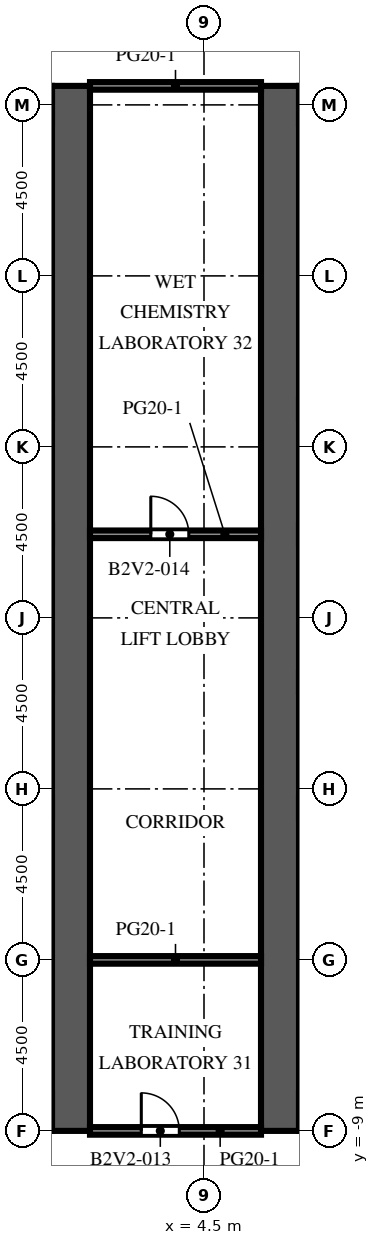
"""IFC4 building model, lengths in metres.
Left out: names, types, materials, properties, quantities, classifications, styles, units other than length and angle.
Written with IfcOpenShell. Run it as: python <this file> out.ifc"""

import sys

from ifc_helpers import new_model, si_unit, direction, frame, frame_2d, origin, place, context, subcontext, project, spatial, rectangle, extrude, element, fill, save


model = new_model("IFC4")
c1 = context("Model", 3, precision=1e-05, world=origin(), true_north=direction((0.0, 1.0)))
c2 = subcontext(c1, "Body", "Model", "MODEL_VIEW")
j1 = project(units=[si_unit("LENGTHUNIT", "METRE"), si_unit("PLANEANGLEUNIT", "RADIAN")], contexts=[c1])
p1 = place(None, origin())
s1 = spatial("IfcSite", under=j1, at=p1, CompositionType="ELEMENT")
p2 = place(p1, origin())
s2 = spatial("IfcBuilding", under=s1, at=p2, CompositionType="ELEMENT")
p3 = place(p2, frame((0.0, 0.0, 58.3)))
s3 = spatial("IfcBuildingStorey", under=s2, at=p3, CompositionType="ELEMENT", Elevation=58.3)
p4 = place(p3, frame((1.0, -9.0, 0.0), z_axis=(0.0, 0.0, 1.0), x_axis=(0.0, 1.0, 0.0)))
e1 = element("IfcWall", 1, at=p4, inside=s3, PredefinedType="SHEAR", context=c2, shape_type="SweptSolid", body=[
    extrude(rectangle(XDim=27.5, YDim=1.0, at=frame_2d((13.75, 0.0))), origin(), (0.0, 0.0, 1.0), 4.1),
])
p5 = place(p4, frame((12.55, 0.0, 0.0)))
e2 = element("IfcOpeningElement", 2, at=p5, cuts=e1, PredefinedType="OPENING", context=c2, shape_type="SweptSolid", body=[
    extrude(rectangle(XDim=2.4, YDim=2.4, at=frame_2d((1.2, 1.2))), frame((0.0, 0.51, 0.0), z_axis=(0.0, -1.0, 0.0), x_axis=(1.0, 0.0, 0.0)), (0.0, 0.0, 1.0), 1.02),
])
p6 = place(p4, frame((5.55, 0.0, 0.0)))
e3 = element("IfcOpeningElement", 3, at=p6, cuts=e1, PredefinedType="OPENING", context=c2, shape_type="SweptSolid", body=[
    extrude(rectangle(XDim=0.905, YDim=2.1, at=frame_2d((0.453, 1.05))), frame((0.0, 0.51, 0.0), z_axis=(0.0, -1.0, 0.0), x_axis=(1.0, 0.0, 0.0)), (0.0, 0.0, 1.0), 1.02),
])
p7 = place(p4, frame((23.363, 0.0, 0.0)))
e4 = element("IfcOpeningElement", 4, at=p7, cuts=e1, PredefinedType="OPENING", context=c2, shape_type="SweptSolid", body=[
    extrude(rectangle(XDim=1.2, YDim=2.1, at=frame_2d((0.6, 1.05))), frame((0.0, 0.51, 0.0), z_axis=(0.0, -1.0, 0.0), x_axis=(1.0, 0.0, 0.0)), (0.0, 0.0, 1.0), 1.02),
])
p8 = place(p3, frame((6.5, -9.0, 0.0), z_axis=(0.0, 0.0, 1.0), x_axis=(0.0, 1.0, 0.0)))
e5 = element("IfcWall", 5, at=p8, inside=s3, PredefinedType="SHEAR", context=c2, shape_type="SweptSolid", body=[
    extrude(rectangle(XDim=27.5, YDim=1.0, at=frame_2d((13.75, 0.0))), origin(), (0.0, 0.0, 1.0), 4.1),
])
p9 = place(p8, frame((12.55, 0.0, 0.0)))
e6 = element("IfcOpeningElement", 6, at=p9, cuts=e5, PredefinedType="OPENING", context=c2, shape_type="SweptSolid", body=[
    extrude(rectangle(XDim=2.4, YDim=2.4, at=frame_2d((1.2, 1.2))), frame((0.0, 0.51, 0.0), z_axis=(0.0, -1.0, 0.0), x_axis=(1.0, 0.0, 0.0)), (0.0, 0.0, 1.0), 1.02),
])
p10 = place(p8, frame((5.55, 0.0, 0.0)))
e7 = element("IfcOpeningElement", 7, at=p10, cuts=e5, PredefinedType="OPENING", context=c2, shape_type="SweptSolid", body=[
    extrude(rectangle(XDim=0.905, YDim=2.1, at=frame_2d((0.453, 1.05))), frame((0.0, 0.51, 0.0), z_axis=(0.0, -1.0, 0.0), x_axis=(1.0, 0.0, 0.0)), (0.0, 0.0, 1.0), 1.02),
])
p11 = place(p8, frame((23.363, 0.0, 0.0)))
e8 = element("IfcOpeningElement", 8, at=p11, cuts=e5, PredefinedType="OPENING", context=c2, shape_type="SweptSolid", body=[
    extrude(rectangle(XDim=1.2, YDim=2.1, at=frame_2d((0.6, 1.05))), frame((0.0, 0.51, 0.0), z_axis=(0.0, -1.0, 0.0), x_axis=(1.0, 0.0, 0.0)), (0.0, 0.0, 1.0), 1.02),
])
p12 = place(p3, frame((7.0, 12.425, 0.0), z_axis=(0.0, 0.0, 1.0), x_axis=(1.0, 0.0, 0.0)))
e9 = element("IfcWall", 9, at=p12, inside=s3, PredefinedType="PARTITIONING", context=c2, shape_type="SweptSolid", body=[
    extrude(rectangle(XDim=1.3, YDim=0.1, at=frame_2d((0.65, 0.0))), origin(), (0.0, 0.0, 1.0), 3.65),
])
p13 = place(p12, frame((0.2, 0.0, 0.0)))
e10 = element("IfcOpeningElement", 10, at=p13, cuts=e9, PredefinedType="OPENING", context=c2, shape_type="SweptSolid", body=[
    extrude(rectangle(XDim=0.9, YDim=2.1, at=frame_2d((0.45, 1.05))), frame((0.0, 0.06, 0.0), z_axis=(0.0, -1.0, 0.0), x_axis=(1.0, 0.0, 0.0)), (0.0, 0.0, 1.0), 0.12),
])
p14 = place(p3, frame((1.5, -9.0, 0.0), z_axis=(0.0, 0.0, 1.0), x_axis=(1.0, 0.0, 0.0)))
e11 = element("IfcWall", 11, at=p14, inside=s3, PredefinedType="PARTITIONING", context=c2, shape_type="SweptSolid", body=[
    extrude(rectangle(XDim=4.5, YDim=0.2, at=frame_2d((2.25, 0.0))), origin(), (0.0, 0.0, 1.0), 3.65),
])
p15 = place(p14, frame((1.35, 0.0, 0.0)))
e12 = element("IfcOpeningElement", 12, at=p15, cuts=e11, PredefinedType="OPENING", context=c2, shape_type="SweptSolid", body=[
    extrude(rectangle(XDim=1.0, YDim=2.1, at=frame_2d((0.5, 1.05))), frame((0.0, 0.11, 0.0), z_axis=(0.0, -1.0, 0.0), x_axis=(1.0, 0.0, 0.0)), (0.0, 0.0, 1.0), 0.22),
])
p16 = place(p3, frame((1.5, -4.5, 0.0), z_axis=(0.0, 0.0, 1.0), x_axis=(1.0, 0.0, 0.0)))
e13 = element("IfcWall", 13, at=p16, inside=s3, PredefinedType="PARTITIONING", context=c2, shape_type="SweptSolid", body=[
    extrude(rectangle(XDim=4.5, YDim=0.2, at=frame_2d((2.25, 0.0))), origin(), (0.0, 0.0, 1.0), 3.65),
])
p17 = place(p3, frame((1.5, 6.7, 0.0), z_axis=(0.0, 0.0, 1.0), x_axis=(1.0, 0.0, 0.0)))
e14 = element("IfcWall", 14, at=p17, inside=s3, PredefinedType="PARTITIONING", context=c2, shape_type="SweptSolid", body=[
    extrude(rectangle(XDim=4.5, YDim=0.2, at=frame_2d((2.25, 0.0))), origin(), (0.0, 0.0, 1.0), 3.65),
])
p18 = place(p17, frame((1.6, 0.0, 0.0)))
e15 = element("IfcOpeningElement", 15, at=p18, cuts=e14, PredefinedType="OPENING", context=c2, shape_type="SweptSolid", body=[
    extrude(rectangle(XDim=1.0, YDim=2.1, at=frame_2d((0.5, 1.05))), frame((0.0, 0.11, 0.0), z_axis=(0.0, -1.0, 0.0), x_axis=(1.0, 0.0, 0.0)), (0.0, 0.0, 1.0), 0.22),
])
p19 = place(p3, frame((1.5, 18.5, 0.0), z_axis=(0.0, 0.0, 1.0), x_axis=(1.0, 0.0, 0.0)))
e16 = element("IfcWall", 16, at=p19, inside=s3, PredefinedType="PARTITIONING", context=c2, shape_type="SweptSolid", body=[
    extrude(rectangle(XDim=4.5, YDim=0.2, at=frame_2d((2.25, 0.0))), origin(), (0.0, 0.0, 1.0), 3.65),
])
p20 = place(p5, origin())
e17 = element("IfcDoor", 17, at=p20, inside=s3, OperationType="DOUBLE_DOOR_DOUBLE_SWING", PredefinedType="DOOR", context=c2, shape_type="SweptSolid", body=[
    extrude(rectangle(XDim=2.4, YDim=2.4, at=frame_2d((1.2, 1.2))), frame((0.0, 0.025, 0.0), z_axis=(0.0, -1.0, 0.0), x_axis=(1.0, 0.0, 0.0)), (0.0, 0.0, 1.0), 0.05),
])
fill(e2, e17)
p21 = place(p9, origin())
e18 = element("IfcDoor", 18, at=p21, inside=s3, OperationType="DOUBLE_DOOR_DOUBLE_SWING", PredefinedType="DOOR", context=c2, shape_type="SweptSolid", body=[
    extrude(rectangle(XDim=2.4, YDim=2.4, at=frame_2d((1.2, 1.2))), frame((0.0, 0.025, 0.0), z_axis=(0.0, -1.0, 0.0), x_axis=(1.0, 0.0, 0.0)), (0.0, 0.0, 1.0), 0.05),
])
fill(e6, e18)
p22 = place(p6, origin())
e19 = element("IfcDoor", 19, at=p22, inside=s3, OperationType="SINGLE_SWING_LEFT", PredefinedType="DOOR", context=c2, shape_type="SweptSolid", body=[
    extrude(rectangle(XDim=0.905, YDim=2.1, at=frame_2d((0.453, 1.05))), frame((0.0, 0.475, 0.0), z_axis=(0.0, -1.0, 0.0), x_axis=(1.0, 0.0, 0.0)), (0.0, 0.0, 1.0), 0.05),
])
fill(e3, e19)
p23 = place(p7, origin())
e20 = element("IfcDoor", 20, at=p23, inside=s3, OperationType="SINGLE_SWING_RIGHT", PredefinedType="DOOR", context=c2, shape_type="SweptSolid", body=[
    extrude(rectangle(XDim=1.2, YDim=2.1, at=frame_2d((0.6, 1.05))), frame((0.0, 0.475, 0.0), z_axis=(0.0, -1.0, 0.0), x_axis=(1.0, 0.0, 0.0)), (0.0, 0.0, 1.0), 0.05),
])
fill(e4, e20)
p24 = place(p10, origin())
e21 = element("IfcDoor", 21, at=p24, inside=s3, OperationType="SINGLE_SWING_RIGHT", PredefinedType="DOOR", context=c2, shape_type="SweptSolid", body=[
    extrude(rectangle(XDim=0.905, YDim=2.1, at=frame_2d((0.453, 1.05))), frame((0.0, -0.425, 0.0), z_axis=(0.0, -1.0, 0.0), x_axis=(1.0, 0.0, 0.0)), (0.0, 0.0, 1.0), 0.05),
])
fill(e7, e21)
p25 = place(p11, origin())
e22 = element("IfcDoor", 22, at=p25, inside=s3, OperationType="SINGLE_SWING_LEFT", PredefinedType="DOOR", context=c2, shape_type="SweptSolid", body=[
    extrude(rectangle(XDim=1.2, YDim=2.1, at=frame_2d((0.6, 1.05))), frame((0.0, -0.425, 0.0), z_axis=(0.0, -1.0, 0.0), x_axis=(1.0, 0.0, 0.0)), (0.0, 0.0, 1.0), 0.05),
])
fill(e8, e22)
p26 = place(p15, origin())
e23 = element("IfcDoor", 23, at=p26, inside=s3, OperationType="SINGLE_SWING_LEFT", PredefinedType="DOOR", context=c2, shape_type="SweptSolid", body=[
    extrude(rectangle(XDim=1.0, YDim=2.1, at=frame_2d((0.5, 1.05))), frame((0.0, 0.025, 0.0), z_axis=(0.0, -1.0, 0.0), x_axis=(1.0, 0.0, 0.0)), (0.0, 0.0, 1.0), 0.05),
])
fill(e12, e23)
p27 = place(p18, origin())
e24 = element("IfcDoor", 24, at=p27, inside=s3, OperationType="SINGLE_SWING_LEFT", PredefinedType="DOOR", context=c2, shape_type="SweptSolid", body=[
    extrude(rectangle(XDim=1.0, YDim=2.1, at=frame_2d((0.5, 1.05))), frame((0.0, 0.025, 0.0), z_axis=(0.0, -1.0, 0.0), x_axis=(1.0, 0.0, 0.0)), (0.0, 0.0, 1.0), 0.05),
])
fill(e15, e24)
save(model, sys.argv[1])
